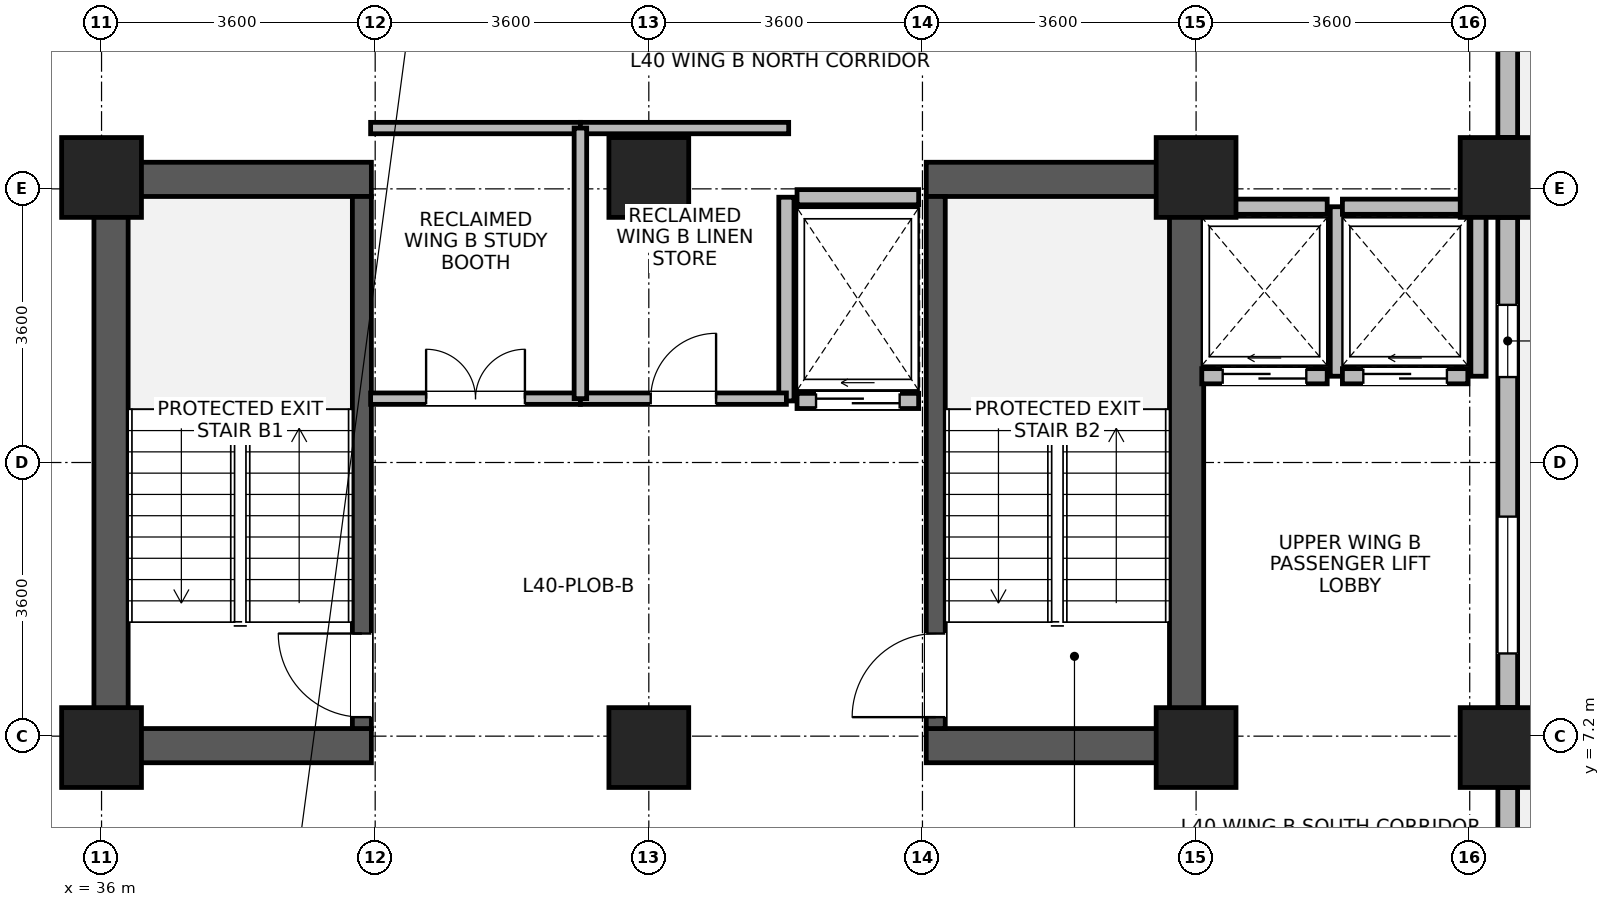
"""IFC4 building model, lengths in metres.
Left out: names, types, materials, properties, quantities, classifications, styles, units other than length and angle.
Written with IfcOpenShell. Run it as: python <this file> out.ifc"""

import sys

from ifc_helpers import new_model, si_unit, direction, frame, frame_2d, origin, origin_2d, place, context, subcontext, project, spatial, rectangle, extrude, source, transform, mapped, element, fill, save


model = new_model("IFC4")
c1 = context("Model", 3, precision=1e-05, world=origin(), true_north=direction((0.0, 1.0)))
c2 = subcontext(c1, "Body", "Model", "MODEL_VIEW")
j1 = project(units=[si_unit("LENGTHUNIT", "METRE"), si_unit("PLANEANGLEUNIT", "RADIAN")], contexts=[c1])
p1 = place(None, origin())
s1 = spatial("IfcSite", under=j1, at=p1, CompositionType="ELEMENT")
p2 = place(p1, origin())
s2 = spatial("IfcBuilding", under=s1, at=p2, CompositionType="ELEMENT")
p3 = place(p2, frame((0.0, 0.0, 158.7)))
s3 = spatial("IfcBuildingStorey", under=s2, at=p3, CompositionType="ELEMENT", Elevation=158.7)
for number, where, z_axis, x_axis in (
    (1, (36.125, 6.85, 0.0), (0.0, 0.0, 1.0), (0.0, 1.0, 0.0)),
    (2, (50.275, 6.85, 0.0), (0.0, 0.0, 1.0), (0.0, 1.0, 0.0)),
):
    element("IfcWall", number, at=place(p3, frame(where, z_axis=z_axis, x_axis=x_axis)), inside=s3, PredefinedType="SHEAR", context=c2, shape_type="SweptSolid", body=[
        extrude(rectangle(XDim=7.9, YDim=0.45, at=frame_2d((3.95, 0.0))), origin(), (0.0, 0.0, 1.0), 3.46),
    ])
for number, where, z_axis, x_axis in (
    (3, (36.35, 7.075, 0.0), (0.0, 0.0, 1.0), (1.0, 0.0, 0.0)),
    (4, (46.85, 7.075, 0.0), (0.0, 0.0, 1.0), (1.0, 0.0, 0.0)),
    (5, (36.35, 14.525, 0.0), (0.0, 0.0, 1.0), (1.0, 0.0, 0.0)),
    (6, (46.85, 14.525, 0.0), (0.0, 0.0, 1.0), (1.0, 0.0, 0.0)),
):
    element("IfcWall", number, at=place(p3, frame(where, z_axis=z_axis, x_axis=x_axis)), inside=s3, PredefinedType="SHEAR", context=c2, shape_type="SweptSolid", body=[
        extrude(rectangle(XDim=3.2, YDim=0.45, at=frame_2d((1.6, 0.0))), origin(), (0.0, 0.0, 1.0), 3.46),
    ])
p4 = place(p3, frame((39.425, 7.3, 0.0), z_axis=(0.0, 0.0, 1.0), x_axis=(0.0, 1.0, 0.0)))
e7 = element("IfcWall", 7, at=p4, inside=s3, PredefinedType="SHEAR", context=c2, shape_type="SweptSolid", body=[
    extrude(rectangle(XDim=7.0, YDim=0.25, at=frame_2d((3.5, 0.0))), origin(), (0.0, 0.0, 1.0), 3.46),
])
p5 = place(p4, frame((0.15, 0.0, 0.0)))
e8 = element("IfcOpeningElement", 8, at=p5, cuts=e7, PredefinedType="OPENING", context=c2, shape_type="SweptSolid", body=[
    extrude(rectangle(XDim=1.1, YDim=2.08, at=frame_2d((0.55, 1.04))), frame((0.0, 0.135, 0.0), z_axis=(0.0, -1.0, 0.0), x_axis=(1.0, 0.0, 0.0)), (0.0, 0.0, 1.0), 0.27),
])
p6 = place(p3, frame((46.975, 7.3, 0.0), z_axis=(0.0, 0.0, 1.0), x_axis=(0.0, 1.0, 0.0)))
e9 = element("IfcWall", 9, at=p6, inside=s3, PredefinedType="SHEAR", context=c2, shape_type="SweptSolid", body=[
    extrude(rectangle(XDim=7.0, YDim=0.25, at=frame_2d((3.5, 0.0))), origin(), (0.0, 0.0, 1.0), 3.46),
])
p7 = place(p6, frame((0.15, 0.0, 0.0)))
e10 = element("IfcOpeningElement", 10, at=p7, cuts=e9, PredefinedType="OPENING", context=c2, shape_type="SweptSolid", body=[
    extrude(rectangle(XDim=1.1, YDim=2.08, at=frame_2d((0.55, 1.04))), frame((0.0, 0.135, 0.0), z_axis=(0.0, -1.0, 0.0), x_axis=(1.0, 0.0, 0.0)), (0.0, 0.0, 1.0), 0.27),
])
m1 = source(origin(), c2, "Body", "SweptSolid", [
    extrude(rectangle(XDim=1.05, YDim=1.05, at=origin_2d()), origin(), (0.0, 0.0, 1.0), 3.7),
])
for number, where, z_axis, x_axis in (
    (11, (36.0, 7.05, 0.0), (0.0, 0.0, 1.0), (1.0, 0.0, 0.0)),
    (12, (36.0, 14.55, 0.0), (0.0, 0.0, 1.0), (1.0, 0.0, 0.0)),
    (13, (43.2, 7.05, 0.0), (0.0, 0.0, 1.0), (1.0, 0.0, 0.0)),
    (14, (43.2, 14.55, 0.0), (0.0, 0.0, 1.0), (1.0, 0.0, 0.0)),
    (15, (50.4, 7.05, 0.0), (0.0, 0.0, 1.0), (1.0, 0.0, 0.0)),
    (16, (50.4, 14.55, 0.0), (0.0, 0.0, 1.0), (1.0, 0.0, 0.0)),
    (17, (54.4, 7.05, 0.0), (0.0, 0.0, 1.0), (1.0, 0.0, 0.0)),
    (18, (54.4, 14.55, 0.0), (0.0, 0.0, 1.0), (1.0, 0.0, 0.0)),
):
    element("IfcColumn", number, at=place(p3, frame(where, z_axis=z_axis, x_axis=x_axis)), inside=s3, PredefinedType="COLUMN", context=c2, shape_type="MappedRepresentation", body=[
        mapped(m1, transform((0.0, 0.0, 0.0), x_axis=(1.0, 0.0, 0.0), y_axis=(0.0, 1.0, 0.0), z_axis=(0.0, 0.0, 1.0), scale=1.0)),
    ])
p8 = place(p3, frame((54.5, 6.524, 0.0), z_axis=(0.0, 0.0, 1.0), x_axis=(0.0, -1.0, 0.0)))
e19 = element("IfcWall", 19, at=p8, inside=s3, PredefinedType="STANDARD", context=c2, shape_type="SweptSolid", body=[
    extrude(rectangle(XDim=4.854, YDim=0.26, at=frame_2d((2.427, 0.0))), origin(), (0.0, 0.0, 1.0), 3.44),
])
p9 = place(p8, frame((2.648, 0.0, 0.0)))
e20 = element("IfcOpeningElement", 20, at=p9, cuts=e19, PredefinedType="OPENING", context=c2, shape_type="SweptSolid", body=[
    extrude(rectangle(XDim=1.5, YDim=2.15, at=frame_2d((0.75, 1.075))), frame((0.0, 0.14, 0.0), z_axis=(0.0, -1.0, 0.0), x_axis=(1.0, 0.0, 0.0)), (0.0, 0.0, 1.0), 0.28),
])
p10 = place(p3, frame((54.5, 14.024, 0.0), z_axis=(0.0, 0.0, 1.0), x_axis=(0.0, -1.0, 0.0)))
e21 = element("IfcWall", 21, at=p10, inside=s3, PredefinedType="STANDARD", context=c2, shape_type="SweptSolid", body=[
    extrude(rectangle(XDim=6.448, YDim=0.26, at=frame_2d((3.224, 0.0))), origin(), (0.0, 0.0, 1.0), 2.99),
])
p11 = place(p10, frame((3.936, 0.0, 0.85)))
e22 = element("IfcOpeningElement", 22, at=p11, cuts=e21, PredefinedType="OPENING", context=c2, shape_type="SweptSolid", body=[
    extrude(rectangle(XDim=1.8, YDim=1.85, at=frame_2d((0.9, 0.925))), frame((0.0, 0.14, 0.0), z_axis=(0.0, -1.0, 0.0), x_axis=(1.0, 0.0, 0.0)), (0.0, 0.0, 1.0), 0.28),
])
p12 = place(p10, frame((1.15, 0.0, 0.85)))
e23 = element("IfcOpeningElement", 23, at=p12, cuts=e21, PredefinedType="OPENING", context=c2, shape_type="SweptSolid", body=[
    extrude(rectangle(XDim=0.95, YDim=1.75, at=frame_2d((0.475, 0.875))), frame((0.0, 0.14, 0.0), z_axis=(0.0, -1.0, 0.0), x_axis=(1.0, 0.0, 0.0)), (0.0, 0.0, 1.0), 0.28),
])
p13 = place(p3, frame((54.5, 21.074, 0.0), z_axis=(0.0, 0.0, 1.0), x_axis=(0.0, -1.0, 0.0)))
e24 = element("IfcWall", 24, at=p13, inside=s3, PredefinedType="STANDARD", context=c2, shape_type="SweptSolid", body=[
    extrude(rectangle(XDim=5.998, YDim=0.26, at=frame_2d((2.999, 0.0))), origin(), (0.0, 0.0, 1.0), 2.99),
])
p14 = place(p13, frame((0.6, 0.0, 0.85)))
e25 = element("IfcOpeningElement", 25, at=p14, cuts=e24, PredefinedType="OPENING", context=c2, shape_type="SweptSolid", body=[
    extrude(rectangle(XDim=1.8, YDim=1.85, at=frame_2d((0.9, 0.925))), frame((0.0, 0.14, 0.0), z_axis=(0.0, -1.0, 0.0), x_axis=(1.0, 0.0, 0.0)), (0.0, 0.0, 1.0), 0.28),
])
p15 = place(p3, frame((50.475, 11.935, 0.0), z_axis=(0.0, 0.0, 1.0), x_axis=(1.0, 0.0, 0.0)))
e26 = element("IfcWall", 26, at=p15, inside=s3, PredefinedType="PARTITIONING", context=c2, shape_type="SweptSolid", body=[
    extrude(rectangle(XDim=1.65, YDim=0.2, at=frame_2d((0.825, 0.0))), origin(), (0.0, 0.0, 1.0), 3.44),
])
p16 = place(p15, frame((0.275, 0.0, 0.0)))
e27 = element("IfcOpeningElement", 27, at=p16, cuts=e26, PredefinedType="OPENING", context=c2, shape_type="SweptSolid", body=[
    extrude(rectangle(XDim=1.1, YDim=2.12, at=frame_2d((0.55, 1.06))), frame((0.0, 0.11, 0.0), z_axis=(0.0, -1.0, 0.0), x_axis=(1.0, 0.0, 0.0)), (0.0, 0.0, 1.0), 0.22),
])
p17 = place(p3, frame((50.475, 14.165, 0.0), z_axis=(0.0, 0.0, 1.0), x_axis=(1.0, 0.0, 0.0)))
e28 = element("IfcWall", 28, at=p17, inside=s3, PredefinedType="PARTITIONING", context=c2, shape_type="SweptSolid", body=[
    extrude(rectangle(XDim=1.65, YDim=0.2, at=frame_2d((0.825, 0.0))), origin(), (0.0, 0.0, 1.0), 3.44),
])
p18 = place(p3, frame((52.265, 11.935, 0.0), z_axis=(0.0, 0.0, 1.0), x_axis=(0.0, 1.0, 0.0)))
e29 = element("IfcWall", 29, at=p18, inside=s3, PredefinedType="PARTITIONING", context=c2, shape_type="SweptSolid", body=[
    extrude(rectangle(XDim=2.23, YDim=0.2, at=frame_2d((1.115, 0.0))), origin(), (0.0, 0.0, 1.0), 3.44),
])
p19 = place(p3, frame((52.325, 11.935, 0.0), z_axis=(0.0, 0.0, 1.0), x_axis=(1.0, 0.0, 0.0)))
e30 = element("IfcWall", 30, at=p19, inside=s3, PredefinedType="PARTITIONING", context=c2, shape_type="SweptSolid", body=[
    extrude(rectangle(XDim=1.65, YDim=0.2, at=frame_2d((0.825, 0.0))), origin(), (0.0, 0.0, 1.0), 3.44),
])
p20 = place(p19, frame((0.275, 0.0, 0.0)))
e31 = element("IfcOpeningElement", 31, at=p20, cuts=e30, PredefinedType="OPENING", context=c2, shape_type="SweptSolid", body=[
    extrude(rectangle(XDim=1.1, YDim=2.12, at=frame_2d((0.55, 1.06))), frame((0.0, 0.11, 0.0), z_axis=(0.0, -1.0, 0.0), x_axis=(1.0, 0.0, 0.0)), (0.0, 0.0, 1.0), 0.22),
])
p21 = place(p3, frame((52.325, 14.165, 0.0), z_axis=(0.0, 0.0, 1.0), x_axis=(1.0, 0.0, 0.0)))
e32 = element("IfcWall", 32, at=p21, inside=s3, PredefinedType="PARTITIONING", context=c2, shape_type="SweptSolid", body=[
    extrude(rectangle(XDim=1.65, YDim=0.2, at=frame_2d((0.825, 0.0))), origin(), (0.0, 0.0, 1.0), 3.44),
])
p22 = place(p3, frame((54.115, 11.935, 0.0), z_axis=(0.0, 0.0, 1.0), x_axis=(0.0, 1.0, 0.0)))
e33 = element("IfcWall", 33, at=p22, inside=s3, PredefinedType="PARTITIONING", context=c2, shape_type="SweptSolid", body=[
    extrude(rectangle(XDim=2.23, YDim=0.2, at=frame_2d((1.115, 0.0))), origin(), (0.0, 0.0, 1.0), 2.99),
])
p23 = place(p3, frame((45.15, 11.61, 0.0), z_axis=(0.0, 0.0, 1.0), x_axis=(1.0, 0.0, 0.0)))
e34 = element("IfcWall", 34, at=p23, inside=s3, PredefinedType="PARTITIONING", context=c2, shape_type="SweptSolid", body=[
    extrude(rectangle(XDim=1.6, YDim=0.2, at=frame_2d((0.8, 0.0))), origin(), (0.0, 0.0, 1.0), 3.44),
])
p24 = place(p23, frame((0.25, 0.0, 0.0)))
e35 = element("IfcOpeningElement", 35, at=p24, cuts=e34, PredefinedType="OPENING", context=c2, shape_type="SweptSolid", body=[
    extrude(rectangle(XDim=1.1, YDim=2.12, at=frame_2d((0.55, 1.06))), frame((0.0, 0.11, 0.0), z_axis=(0.0, -1.0, 0.0), x_axis=(1.0, 0.0, 0.0)), (0.0, 0.0, 1.0), 0.22),
])
p25 = place(p3, frame((45.15, 14.29, 0.0), z_axis=(0.0, 0.0, 1.0), x_axis=(1.0, 0.0, 0.0)))
e36 = element("IfcWall", 36, at=p25, inside=s3, PredefinedType="PARTITIONING", context=c2, shape_type="SweptSolid", body=[
    extrude(rectangle(XDim=1.6, YDim=0.2, at=frame_2d((0.8, 0.0))), origin(), (0.0, 0.0, 1.0), 2.44),
])
p26 = place(p3, frame((45.01, 11.61, 0.0), z_axis=(0.0, 0.0, 1.0), x_axis=(0.0, 1.0, 0.0)))
e37 = element("IfcWall", 37, at=p26, inside=s3, PredefinedType="PARTITIONING", context=c2, shape_type="SweptSolid", body=[
    extrude(rectangle(XDim=2.68, YDim=0.2, at=frame_2d((1.34, 0.0))), origin(), (0.0, 0.0, 1.0), 3.44),
])
p27 = place(p3, frame((39.54, 11.64, 0.0), z_axis=(0.0, 0.0, 1.0), x_axis=(1.0, 0.0, 0.0)))
e38 = element("IfcWall", 38, at=p27, inside=s3, PredefinedType="PARTITIONING", context=c2, shape_type="SweptSolid", body=[
    extrude(rectangle(XDim=2.76, YDim=0.15, at=frame_2d((1.38, 0.0))), origin(), (0.0, 0.0, 1.0), 3.44),
])
p28 = place(p27, frame((0.73, 0.0, 0.0)))
e39 = element("IfcOpeningElement", 39, at=p28, cuts=e38, PredefinedType="OPENING", context=c2, shape_type="SweptSolid", body=[
    extrude(rectangle(XDim=1.3, YDim=2.12, at=frame_2d((0.65, 1.06))), frame((0.0, 0.085, 0.0), z_axis=(0.0, -1.0, 0.0), x_axis=(1.0, 0.0, 0.0)), (0.0, 0.0, 1.0), 0.17),
])
p29 = place(p3, frame((39.54, 15.2, 0.0), z_axis=(0.0, 0.0, 1.0), x_axis=(1.0, 0.0, 0.0)))
e40 = element("IfcWall", 40, at=p29, inside=s3, PredefinedType="PARTITIONING", context=c2, shape_type="SweptSolid", body=[
    extrude(rectangle(XDim=2.76, YDim=0.15, at=frame_2d((1.38, 0.0))), origin(), (0.0, 0.0, 1.0), 3.44),
])
p30 = place(p3, frame((42.3, 11.64, 0.0), z_axis=(0.0, 0.0, 1.0), x_axis=(1.0, 0.0, 0.0)))
e41 = element("IfcWall", 41, at=p30, inside=s3, PredefinedType="PARTITIONING", context=c2, shape_type="SweptSolid", body=[
    extrude(rectangle(XDim=2.71, YDim=0.15, at=frame_2d((1.355, 0.0))), origin(), (0.0, 0.0, 1.0), 3.44),
])
p31 = place(p30, frame((0.925, 0.0, 0.0)))
e42 = element("IfcOpeningElement", 42, at=p31, cuts=e41, PredefinedType="OPENING", context=c2, shape_type="SweptSolid", body=[
    extrude(rectangle(XDim=0.86, YDim=2.02, at=frame_2d((0.43, 1.01))), frame((0.0, 0.085, 0.0), z_axis=(0.0, -1.0, 0.0), x_axis=(1.0, 0.0, 0.0)), (0.0, 0.0, 1.0), 0.17),
])
p32 = place(p3, frame((42.3, 15.2, 0.0), z_axis=(0.0, 0.0, 1.0), x_axis=(1.0, 0.0, 0.0)))
e43 = element("IfcWall", 43, at=p32, inside=s3, PredefinedType="PARTITIONING", context=c2, shape_type="SweptSolid", body=[
    extrude(rectangle(XDim=2.74, YDim=0.15, at=frame_2d((1.37, 0.0))), origin(), (0.0, 0.0, 1.0), 3.44),
])
p33 = place(p3, frame((42.3, 11.64, 0.0), z_axis=(0.0, 0.0, 1.0), x_axis=(0.0, 1.0, 0.0)))
e44 = element("IfcWall", 44, at=p33, inside=s3, PredefinedType="PARTITIONING", context=c2, shape_type="SweptSolid", body=[
    extrude(rectangle(XDim=3.56, YDim=0.165, at=frame_2d((1.78, 0.0))), origin(), (0.0, 0.0, 1.0), 3.44),
])
p34 = place(p11, origin())
e45 = element("IfcWindow", 45, at=p34, inside=s3, PartitioningType="SINGLE_PANEL", PredefinedType="WINDOW", context=c2, shape_type="SweptSolid", body=[
    extrude(rectangle(XDim=1.8, YDim=1.85, at=frame_2d((0.9, 0.925))), frame((0.0, 0.03, 0.0), z_axis=(0.0, -1.0, 0.0), x_axis=(1.0, 0.0, 0.0)), (0.0, 0.0, 1.0), 0.06),
])
fill(e22, e45)
p35 = place(p12, origin())
e46 = element("IfcWindow", 46, at=p35, inside=s3, PartitioningType="SINGLE_PANEL", PredefinedType="WINDOW", context=c2, shape_type="SweptSolid", body=[
    extrude(rectangle(XDim=0.95, YDim=1.75, at=frame_2d((0.475, 0.875))), frame((0.0, 0.03, 0.0), z_axis=(0.0, -1.0, 0.0), x_axis=(1.0, 0.0, 0.0)), (0.0, 0.0, 1.0), 0.06),
])
fill(e23, e46)
p36 = place(p5, origin())
e47 = element("IfcDoor", 47, at=p36, inside=s3, OperationType="SINGLE_SWING_RIGHT", PredefinedType="DOOR", context=c2, shape_type="SweptSolid", body=[
    extrude(rectangle(XDim=1.1, YDim=2.08, at=frame_2d((0.55, 1.04))), frame((0.0, 0.025, 0.0), z_axis=(0.0, -1.0, 0.0), x_axis=(1.0, 0.0, 0.0)), (0.0, 0.0, 1.0), 0.05),
])
fill(e8, e47)
p37 = place(p7, origin())
e48 = element("IfcDoor", 48, at=p37, inside=s3, OperationType="SINGLE_SWING_LEFT", PredefinedType="DOOR", context=c2, shape_type="SweptSolid", body=[
    extrude(rectangle(XDim=1.1, YDim=2.08, at=frame_2d((0.55, 1.04))), frame((0.0, 0.025, 0.0), z_axis=(0.0, -1.0, 0.0), x_axis=(1.0, 0.0, 0.0)), (0.0, 0.0, 1.0), 0.05),
])
fill(e10, e48)
p38 = place(p16, origin())
e49 = element("IfcDoor", 49, at=p38, inside=s3, OperationType="SLIDING_TO_LEFT", PredefinedType="DOOR", context=c2, shape_type="SweptSolid", body=[
    extrude(rectangle(XDim=1.1, YDim=2.12, at=frame_2d((0.55, 1.06))), frame((0.0, 0.025, 0.0), z_axis=(0.0, -1.0, 0.0), x_axis=(1.0, 0.0, 0.0)), (0.0, 0.0, 1.0), 0.05),
])
fill(e27, e49)
p39 = place(p20, origin())
e50 = element("IfcDoor", 50, at=p39, inside=s3, OperationType="SLIDING_TO_LEFT", PredefinedType="DOOR", context=c2, shape_type="SweptSolid", body=[
    extrude(rectangle(XDim=1.1, YDim=2.12, at=frame_2d((0.55, 1.06))), frame((0.0, 0.025, 0.0), z_axis=(0.0, -1.0, 0.0), x_axis=(1.0, 0.0, 0.0)), (0.0, 0.0, 1.0), 0.05),
])
fill(e31, e50)
p40 = place(p24, origin())
e51 = element("IfcDoor", 51, at=p40, inside=s3, OperationType="SLIDING_TO_LEFT", PredefinedType="DOOR", context=c2, shape_type="SweptSolid", body=[
    extrude(rectangle(XDim=1.1, YDim=2.12, at=frame_2d((0.55, 1.06))), frame((0.0, 0.025, 0.0), z_axis=(0.0, -1.0, 0.0), x_axis=(1.0, 0.0, 0.0)), (0.0, 0.0, 1.0), 0.05),
])
fill(e35, e51)
p41 = place(p28, origin())
e52 = element("IfcDoor", 52, at=p41, inside=s3, OperationType="DOUBLE_DOOR_SINGLE_SWING", PredefinedType="DOOR", context=c2, shape_type="SweptSolid", body=[
    extrude(rectangle(XDim=1.3, YDim=2.12, at=frame_2d((0.65, 1.06))), frame((0.0, 0.025, 0.0), z_axis=(0.0, -1.0, 0.0), x_axis=(1.0, 0.0, 0.0)), (0.0, 0.0, 1.0), 0.05),
])
fill(e39, e52)
p42 = place(p31, origin())
e53 = element("IfcDoor", 53, at=p42, inside=s3, OperationType="SINGLE_SWING_RIGHT", PredefinedType="DOOR", context=c2, shape_type="SweptSolid", body=[
    extrude(rectangle(XDim=0.86, YDim=2.02, at=frame_2d((0.43, 1.01))), frame((0.0, 0.025, 0.0), z_axis=(0.0, -1.0, 0.0), x_axis=(1.0, 0.0, 0.0)), (0.0, 0.0, 1.0), 0.05),
])
fill(e42, e53)
save(model, sys.argv[1])
